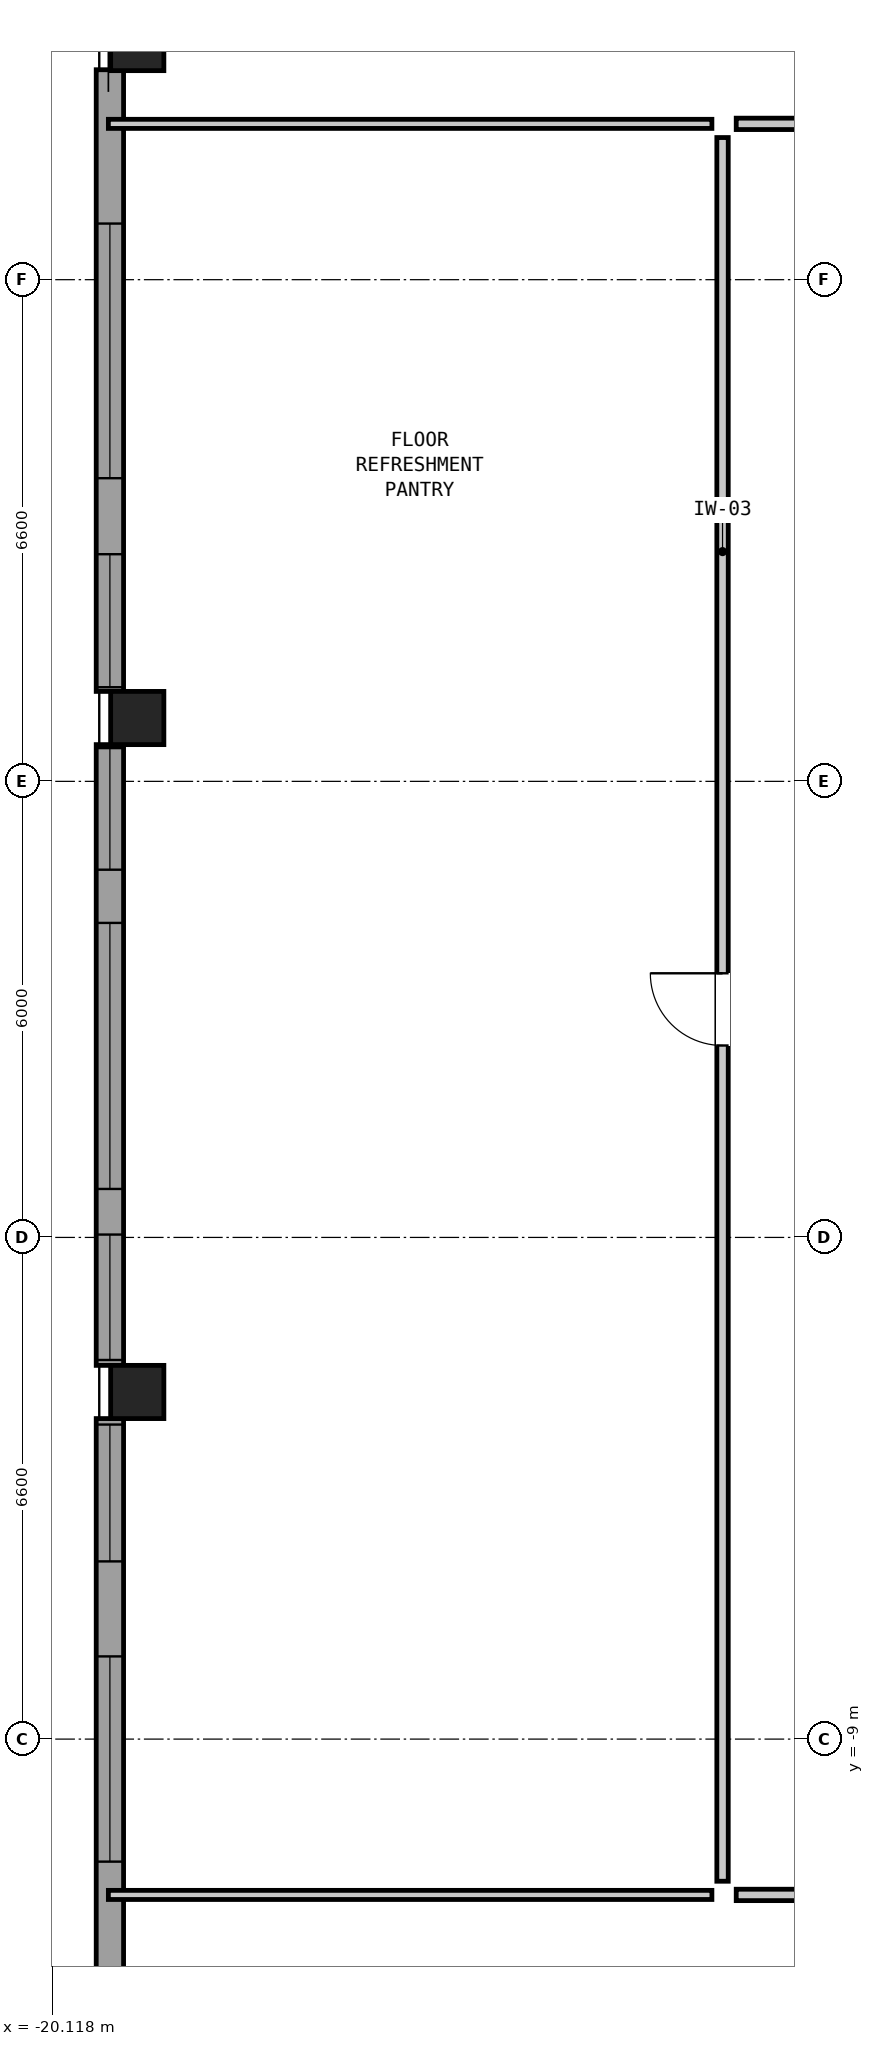
"""IFC4 building model, lengths in metres.
Left out: names, types, materials, properties, quantities, classifications, styles, units other than length and angle.
Written with IfcOpenShell. Run it as: python <this file> out.ifc"""

import sys

from ifc_helpers import new_model, si_unit, direction, frame, frame_2d, origin, origin_2d, place, context, subcontext, project, spatial, rectangle, hollow_rectangle, extrude, element, fill, save


model = new_model("IFC4")
c1 = context("Model", 3, precision=1e-05, world=origin(), true_north=direction((0.0, 1.0)))
c2 = subcontext(c1, "Body", "Model", "MODEL_VIEW")
j1 = project(units=[si_unit("LENGTHUNIT", "METRE"), si_unit("PLANEANGLEUNIT", "RADIAN")], contexts=[c1])
p1 = place(None, origin())
s1 = spatial("IfcSite", under=j1, at=p1, CompositionType="ELEMENT")
p2 = place(p1, origin())
s2 = spatial("IfcBuilding", under=s1, at=p2, CompositionType="ELEMENT")
p3 = place(p2, frame((0.0, 0.0, 202.55)))
s3 = spatial("IfcBuildingStorey", under=s2, at=p3, CompositionType="ELEMENT", Elevation=202.55)
for number, where, z_axis, x_axis in (
    (1, (-19.0, 13.3, 0.0), (0.0, 0.0, 1.0), (0.0, 1.0, 0.0)),
    (2, (-19.0, 4.433, 0.0), (0.0, 0.0, 1.0), (0.0, 1.0, 0.0)),
    (3, (-19.0, -4.433, 0.0), (0.0, 0.0, 1.0), (0.0, 1.0, 0.0)),
):
    element("IfcColumn", number, at=place(p3, frame(where, z_axis=z_axis, x_axis=x_axis)), inside=s3, PredefinedType="COLUMN", context=c2, shape_type="SweptSolid", body=[
        extrude(hollow_rectangle(XDim=0.7, YDim=0.7, WallThickness=0.045, at=origin_2d()), origin(), (0.0, 0.0, 1.0), 3.05),
    ])
p4 = place(p3, frame((-19.36, -12.962, 0.0), z_axis=(0.0, 0.0, 1.0), x_axis=(0.0, 1.0, 0.0)))
e4 = element("IfcWall", 4, at=p4, inside=s3, PredefinedType="SOLIDWALL", context=c2, shape_type="SweptSolid", body=[
    extrude(rectangle(XDim=8.179, YDim=0.36, at=frame_2d((4.089, 0.0))), origin(), (0.0, 0.0, 1.0), 2.374),
])
p5 = place(p4, frame((2.35, 0.0, 0.2)))
e5 = element("IfcOpeningElement", 5, at=p5, cuts=e4, PredefinedType="OPENING", context=c2, shape_type="SweptSolid", body=[
    extrude(rectangle(XDim=2.7, YDim=1.2, at=frame_2d((1.35, 0.6))), frame((0.0, 0.192, 0.0), z_axis=(0.0, -1.0, 0.0), x_axis=(1.0, 0.0, 0.0)), (0.0, 0.0, 1.0), 0.384),
])
p6 = place(p4, frame((6.3, 0.0, 1.15)))
e6 = element("IfcOpeningElement", 6, at=p6, cuts=e4, PredefinedType="OPENING", context=c2, shape_type="SweptSolid", body=[
    extrude(rectangle(XDim=1.8, YDim=1.05, at=frame_2d((0.9, 0.525))), frame((0.0, 0.192, 0.0), z_axis=(0.0, -1.0, 0.0), x_axis=(1.0, 0.0, 0.0)), (0.0, 0.0, 1.0), 0.384),
])
p7 = place(p3, frame((-19.36, -4.083, 0.0), z_axis=(0.0, 0.0, 1.0), x_axis=(0.0, 1.0, 0.0)))
e7 = element("IfcWall", 7, at=p7, inside=s3, PredefinedType="SOLIDWALL", context=c2, shape_type="SweptSolid", body=[
    extrude(rectangle(XDim=8.167, YDim=0.36, at=frame_2d((4.083, 0.0))), origin(), (0.0, 0.0, 1.0), 2.374),
])
p8 = place(p7, frame((0.071, 0.0, 1.3)))
e8 = element("IfcOpeningElement", 8, at=p8, cuts=e7, PredefinedType="OPENING", context=c2, shape_type="SweptSolid", body=[
    extrude(rectangle(XDim=1.65, YDim=0.9, at=frame_2d((0.825, 0.45))), frame((0.0, 0.192, 0.0), z_axis=(0.0, -1.0, 0.0), x_axis=(1.0, 0.0, 0.0)), (0.0, 0.0, 1.0), 0.384),
])
p9 = place(p7, frame((2.321, 0.0, 0.2)))
e9 = element("IfcOpeningElement", 9, at=p9, cuts=e7, PredefinedType="OPENING", context=c2, shape_type="SweptSolid", body=[
    extrude(rectangle(XDim=3.5, YDim=0.95, at=frame_2d((1.75, 0.475))), frame((0.0, 0.192, 0.0), z_axis=(0.0, -1.0, 0.0), x_axis=(1.0, 0.0, 0.0)), (0.0, 0.0, 1.0), 0.384),
])
p10 = place(p7, frame((6.521, 0.0, 1.25)))
e10 = element("IfcOpeningElement", 10, at=p10, cuts=e7, PredefinedType="OPENING", context=c2, shape_type="SweptSolid", body=[
    extrude(rectangle(XDim=1.6, YDim=0.95, at=frame_2d((0.8, 0.475))), frame((0.0, 0.192, 0.0), z_axis=(0.0, -1.0, 0.0), x_axis=(1.0, 0.0, 0.0)), (0.0, 0.0, 1.0), 0.384),
])
p11 = place(p3, frame((-19.36, 4.783, 0.0), z_axis=(0.0, 0.0, 1.0), x_axis=(0.0, 1.0, 0.0)))
e11 = element("IfcWall", 11, at=p11, inside=s3, PredefinedType="SOLIDWALL", context=c2, shape_type="SweptSolid", body=[
    extrude(rectangle(XDim=8.179, YDim=0.36, at=frame_2d((4.089, 0.0))), origin(), (0.0, 0.0, 1.0), 2.374),
])
p12 = place(p11, frame((0.055, 0.0, 1.1)))
e12 = element("IfcOpeningElement", 12, at=p12, cuts=e11, PredefinedType="OPENING", context=c2, shape_type="SweptSolid", body=[
    extrude(rectangle(XDim=1.75, YDim=1.1, at=frame_2d((0.875, 0.55))), frame((0.0, 0.192, 0.0), z_axis=(0.0, -1.0, 0.0), x_axis=(1.0, 0.0, 0.0)), (0.0, 0.0, 1.0), 0.384),
])
p13 = place(p11, frame((2.805, 0.0, 0.2)))
e13 = element("IfcOpeningElement", 13, at=p13, cuts=e11, PredefinedType="OPENING", context=c2, shape_type="SweptSolid", body=[
    extrude(rectangle(XDim=3.35, YDim=1.0, at=frame_2d((1.675, 0.5))), frame((0.0, 0.192, 0.0), z_axis=(0.0, -1.0, 0.0), x_axis=(1.0, 0.0, 0.0)), (0.0, 0.0, 1.0), 0.384),
])
for number, where, z_axis, x_axis in (
    (14, (-19.38, 12.25, 0.0), (0.0, 0.0, 1.0), (1.0, 0.0, 0.0)),
    (15, (-19.38, -11.05, 0.0), (0.0, 0.0, 1.0), (1.0, 0.0, 0.0)),
):
    element("IfcWall", number, at=place(p3, frame(where, z_axis=z_axis, x_axis=x_axis)), inside=s3, PredefinedType="PARTITIONING", context=c2, shape_type="SweptSolid", body=[
        extrude(rectangle(XDim=7.94, YDim=0.12, at=frame_2d((3.97, 0.0))), origin(), (0.0, 0.0, 1.0), 2.86),
    ])
p14 = place(p3, frame((-11.12, 12.25, 0.0), z_axis=(0.0, 0.0, 1.0), x_axis=(1.0, 0.0, 0.0)))
e16 = element("IfcWall", 16, at=p14, inside=s3, PredefinedType="PARTITIONING", context=c2, shape_type="SweptSolid", body=[
    extrude(rectangle(XDim=9.84, YDim=0.15, at=frame_2d((4.92, 0.0))), origin(), (0.0, 0.0, 1.0), 2.86),
])
p15 = place(p14, frame((4.445, 0.0, 0.0)))
e17 = element("IfcOpeningElement", 17, at=p15, cuts=e16, PredefinedType="OPENING", context=c2, shape_type="SweptSolid", body=[
    extrude(rectangle(XDim=0.95, YDim=2.1, at=frame_2d((0.475, 1.05))), frame((0.0, 0.087, 0.0), z_axis=(0.0, -1.0, 0.0), x_axis=(1.0, 0.0, 0.0)), (0.0, 0.0, 1.0), 0.174),
])
p16 = place(p3, frame((-11.12, -11.05, 0.0), z_axis=(0.0, 0.0, 1.0), x_axis=(1.0, 0.0, 0.0)))
e18 = element("IfcWall", 18, at=p16, inside=s3, PredefinedType="PARTITIONING", context=c2, shape_type="SweptSolid", body=[
    extrude(rectangle(XDim=22.59, YDim=0.15, at=frame_2d((11.295, 0.0))), origin(), (0.0, 0.0, 1.0), 2.86),
])
p17 = place(p16, frame((10.82, 0.0, 0.0)))
e19 = element("IfcOpeningElement", 19, at=p17, cuts=e18, PredefinedType="OPENING", context=c2, shape_type="SweptSolid", body=[
    extrude(rectangle(XDim=0.95, YDim=2.1, at=frame_2d((0.475, 1.05))), frame((0.0, 0.087, 0.0), z_axis=(0.0, -1.0, 0.0), x_axis=(1.0, 0.0, 0.0)), (0.0, 0.0, 1.0), 0.174),
])
p18 = place(p3, frame((-11.3, -10.87, 0.0), z_axis=(0.0, 0.0, 1.0), x_axis=(0.0, 1.0, 0.0)))
e20 = element("IfcWall", 20, at=p18, inside=s3, PredefinedType="PARTITIONING", context=c2, shape_type="SweptSolid", body=[
    extrude(rectangle(XDim=22.94, YDim=0.15, at=frame_2d((11.47, 0.0))), origin(), (0.0, 0.0, 1.0), 2.86),
])
p19 = place(p18, frame((10.995, 0.0, 0.0)))
e21 = element("IfcOpeningElement", 21, at=p19, cuts=e20, PredefinedType="OPENING", context=c2, shape_type="SweptSolid", body=[
    extrude(rectangle(XDim=0.95, YDim=2.1, at=frame_2d((0.475, 1.05))), frame((0.0, 0.087, 0.0), z_axis=(0.0, -1.0, 0.0), x_axis=(1.0, 0.0, 0.0)), (0.0, 0.0, 1.0), 0.174),
])
p20 = place(p5, origin())
e22 = element("IfcWindow", 22, at=p20, inside=s3, PartitioningType="SINGLE_PANEL", PredefinedType="WINDOW", context=c2, shape_type="SweptSolid", body=[
    extrude(rectangle(XDim=2.7, YDim=1.2, at=frame_2d((1.35, 0.6))), frame((0.0, 0.03, 0.0), z_axis=(0.0, -1.0, 0.0), x_axis=(1.0, 0.0, 0.0)), (0.0, 0.0, 1.0), 0.06),
])
fill(e5, e22)
p21 = place(p6, origin())
e23 = element("IfcWindow", 23, at=p21, inside=s3, PartitioningType="SINGLE_PANEL", PredefinedType="WINDOW", context=c2, shape_type="SweptSolid", body=[
    extrude(rectangle(XDim=1.8, YDim=1.05, at=frame_2d((0.9, 0.525))), frame((0.0, 0.03, 0.0), z_axis=(0.0, -1.0, 0.0), x_axis=(1.0, 0.0, 0.0)), (0.0, 0.0, 1.0), 0.06),
])
fill(e6, e23)
p22 = place(p8, origin())
e24 = element("IfcWindow", 24, at=p22, inside=s3, PartitioningType="SINGLE_PANEL", PredefinedType="WINDOW", context=c2, shape_type="SweptSolid", body=[
    extrude(rectangle(XDim=1.65, YDim=0.9, at=frame_2d((0.825, 0.45))), frame((0.0, 0.03, 0.0), z_axis=(0.0, -1.0, 0.0), x_axis=(1.0, 0.0, 0.0)), (0.0, 0.0, 1.0), 0.06),
])
fill(e8, e24)
p23 = place(p9, origin())
e25 = element("IfcWindow", 25, at=p23, inside=s3, PartitioningType="SINGLE_PANEL", PredefinedType="WINDOW", context=c2, shape_type="SweptSolid", body=[
    extrude(rectangle(XDim=3.5, YDim=0.95, at=frame_2d((1.75, 0.475))), frame((0.0, 0.03, 0.0), z_axis=(0.0, -1.0, 0.0), x_axis=(1.0, 0.0, 0.0)), (0.0, 0.0, 1.0), 0.06),
])
fill(e9, e25)
p24 = place(p10, origin())
e26 = element("IfcWindow", 26, at=p24, inside=s3, PartitioningType="SINGLE_PANEL", PredefinedType="WINDOW", context=c2, shape_type="SweptSolid", body=[
    extrude(rectangle(XDim=1.6, YDim=0.95, at=frame_2d((0.8, 0.475))), frame((0.0, 0.03, 0.0), z_axis=(0.0, -1.0, 0.0), x_axis=(1.0, 0.0, 0.0)), (0.0, 0.0, 1.0), 0.06),
])
fill(e10, e26)
p25 = place(p12, origin())
e27 = element("IfcWindow", 27, at=p25, inside=s3, PartitioningType="SINGLE_PANEL", PredefinedType="WINDOW", context=c2, shape_type="SweptSolid", body=[
    extrude(rectangle(XDim=1.75, YDim=1.1, at=frame_2d((0.875, 0.55))), frame((0.0, 0.03, 0.0), z_axis=(0.0, -1.0, 0.0), x_axis=(1.0, 0.0, 0.0)), (0.0, 0.0, 1.0), 0.06),
])
fill(e12, e27)
p26 = place(p13, origin())
e28 = element("IfcWindow", 28, at=p26, inside=s3, PartitioningType="SINGLE_PANEL", PredefinedType="WINDOW", context=c2, shape_type="SweptSolid", body=[
    extrude(rectangle(XDim=3.35, YDim=1.0, at=frame_2d((1.675, 0.5))), frame((0.0, 0.03, 0.0), z_axis=(0.0, -1.0, 0.0), x_axis=(1.0, 0.0, 0.0)), (0.0, 0.0, 1.0), 0.06),
])
fill(e13, e28)
p27 = place(p19, origin())
e29 = element("IfcDoor", 29, at=p27, inside=s3, OperationType="SINGLE_SWING_RIGHT", PredefinedType="DOOR", context=c2, shape_type="SweptSolid", body=[
    extrude(rectangle(XDim=0.95, YDim=2.1, at=frame_2d((0.475, 1.05))), frame((0.0, 0.025, 0.0), z_axis=(0.0, -1.0, 0.0), x_axis=(1.0, 0.0, 0.0)), (0.0, 0.0, 1.0), 0.05),
])
fill(e21, e29)
save(model, sys.argv[1])
